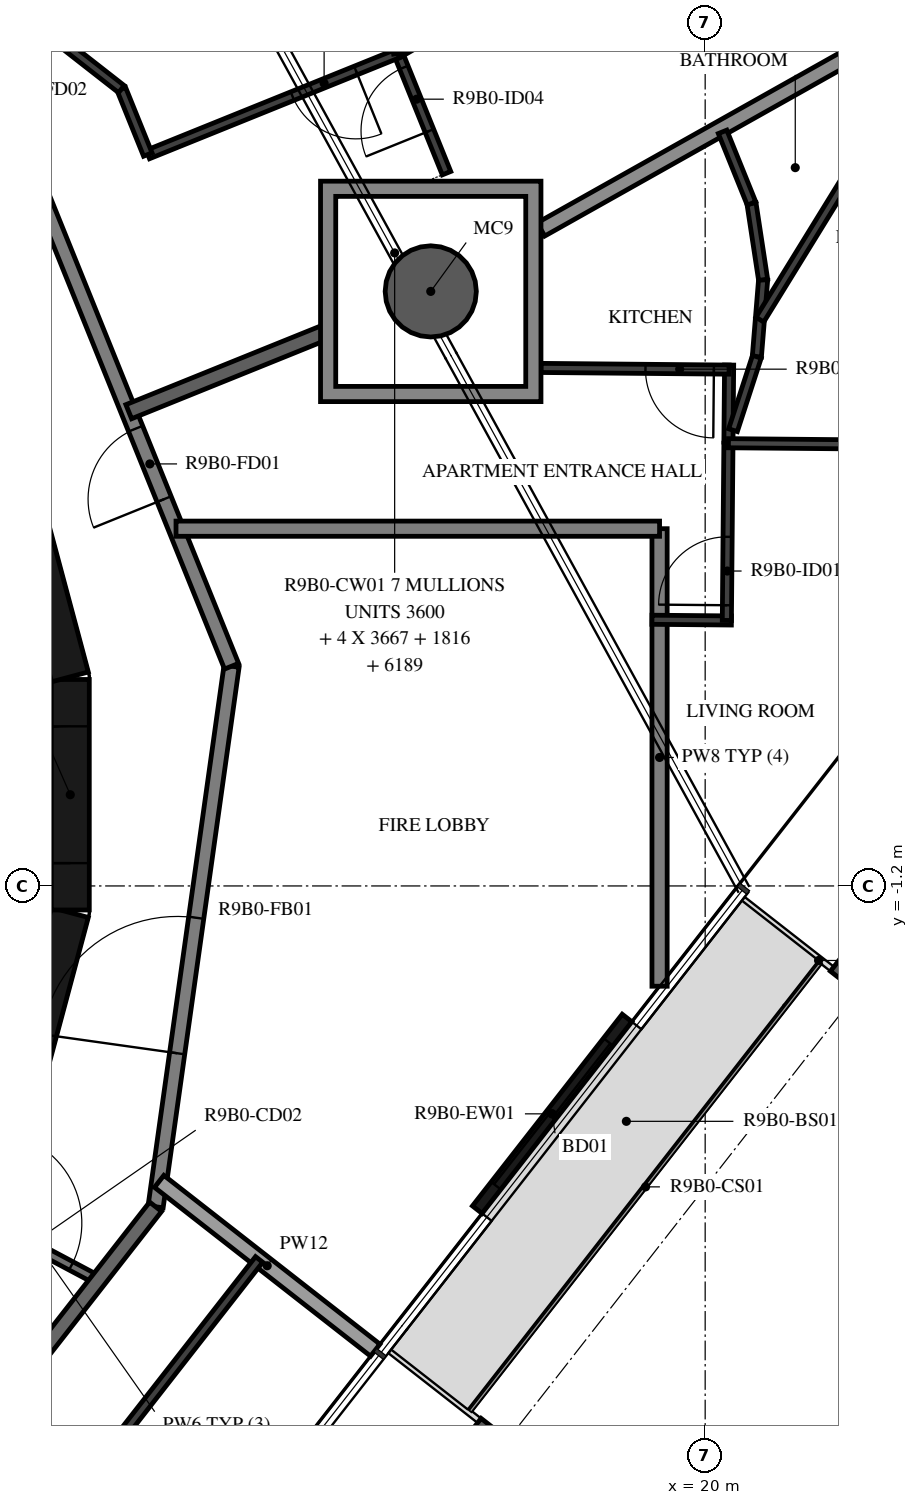
"""IFC4 building model, lengths in metres.
Left out: names, types, materials, properties, quantities, classifications, styles, units other than length and angle.
Written with IfcOpenShell. Run it as: python <this file> out.ifc"""

import sys

from ifc_helpers import new_model, si_unit, direction, frame, frame_2d, origin, origin_2d, place, context, subcontext, project, spatial, polyline, rectangle, hollow_circle, i_section, outline, extrude, element, fill, save


model = new_model("IFC4")
c1 = context("Model", 3, precision=1e-05, world=origin(), true_north=direction((0.0, 1.0)))
c2 = subcontext(c1, "Body", "Model", "MODEL_VIEW")
j1 = project(units=[si_unit("LENGTHUNIT", "METRE"), si_unit("PLANEANGLEUNIT", "RADIAN")], contexts=[c1])
p1 = place(None, origin())
s1 = spatial("IfcSite", under=j1, at=p1, CompositionType="ELEMENT")
p2 = place(p1, origin())
s2 = spatial("IfcBuilding", under=s1, at=p2, CompositionType="ELEMENT")
p3 = place(p2, frame((0.0, 0.0, 347.0)))
s3 = spatial("IfcBuildingStorey", under=s2, at=p3, CompositionType="ELEMENT", Elevation=347.0)
p4 = place(p3, frame((16.39, 6.622, -0.38), z_axis=(0.0, 0.0, 1.0), x_axis=(1.0, 0.0, 0.0)))
e1 = element("IfcColumn", 1, at=p4, inside=s3, PredefinedType="COLUMN", context=c2, shape_type="SweptSolid", body=[
    extrude(hollow_circle(Radius=0.6, WallThickness=0.03, at=origin_2d()), origin(), (0.0, 0.0, 1.0), 3.5),
])
for number, where, z_axis, x_axis in (
    (2, (17.314, -8.6, -0.38), (0.0, 0.0, 1.0), (-0.616, -0.788, 0.0)),
    (3, (22.095, -2.481, -0.38), (0.0, 0.0, 1.0), (-0.616, -0.788, 0.0)),
):
    element("IfcColumn", number, at=place(p3, frame(where, z_axis=z_axis, x_axis=x_axis)), inside=s3, PredefinedType="COLUMN", context=c2, shape_type="SweptSolid", body=[
        extrude(i_section(OverallWidth=0.3, OverallDepth=0.9, WebThickness=0.019, FlangeThickness=0.035, FilletRadius=0.03, at=origin_2d()), origin(), (0.0, 0.0, 1.0), 3.5),
    ])
p5 = place(p3, frame((17.002, -5.459, 0.0), z_axis=(0.0, 0.0, 1.0), x_axis=(0.615666248856, 0.788007024093, 0.0)))
e4 = element("IfcWall", 4, at=p5, inside=s3, PredefinedType="STANDARD", context=c2, shape_type="SweptSolid", body=[
    extrude(rectangle(XDim=3.2, YDim=0.16, at=frame_2d((1.6, 0.0))), origin(), (0.0, 0.0, 1.0), 3.12),
])
p6 = place(p5, frame((0.4, 0.0, 0.0)))
e5 = element("IfcOpeningElement", 5, at=p6, cuts=e4, PredefinedType="OPENING", context=c2, shape_type="SweptSolid", body=[
    extrude(rectangle(XDim=2.4, YDim=2.4, at=frame_2d((1.2, 1.2))), frame((0.0, 0.09, 0.0), z_axis=(0.0, -1.0, 0.0), x_axis=(1.0, 0.0, 0.0)), (0.0, 0.0, 1.0), 0.18),
])
p7 = place(p3, frame((10.858, -4.479, 0.0), z_axis=(0.0, 0.0, 1.0), x_axis=(0.258734743916, 0.965948410781, 0.0)))
e6 = element("IfcWall", 6, at=p7, inside=s3, PredefinedType="SHEAR", context=c2, shape_type="SweptSolid", body=[
    extrude(rectangle(XDim=3.033, YDim=0.5, at=frame_2d((1.516, 0.0))), origin(), (0.0, 0.0, 1.0), 3.12),
])
p8 = place(p3, frame((11.647, -1.516, 0.0), z_axis=(0.0, 0.0, 1.0), x_axis=(0.0, 1.0, 0.0)))
e7 = element("IfcWall", 7, at=p8, inside=s3, PredefinedType="SHEAR", context=c2, shape_type="SweptSolid", body=[
    extrude(rectangle(XDim=3.033, YDim=0.5, at=frame_2d((1.516, 0.0))), origin(), (0.0, 0.0, 1.0), 3.12),
])
p9 = place(p8, frame((0.616, 0.0, 0.0)))
e8 = element("IfcOpeningElement", 8, at=p9, cuts=e7, PredefinedType="OPENING", context=c2, shape_type="SweptSolid", body=[
    extrude(rectangle(XDim=1.8, YDim=2.1, at=frame_2d((0.9, 1.05))), frame((0.0, 0.26, 0.0), z_axis=(0.0, -1.0, 0.0), x_axis=(1.0, 0.0, 0.0)), (0.0, 0.0, 1.0), 0.52),
])
p10 = place(p3, frame((11.643, 1.55, 0.0), z_axis=(0.0, 0.0, 1.0), x_axis=(-0.258734743916, 0.965948410781, 0.0)))
e9 = element("IfcWall", 9, at=p10, inside=s3, PredefinedType="SHEAR", context=c2, shape_type="SweptSolid", body=[
    extrude(rectangle(XDim=3.033, YDim=0.5, at=frame_2d((1.516, 0.0))), origin(), (0.0, 0.0, 1.0), 3.12),
])
p11 = place(p3, frame((10.511, -5.589, 0.0), z_axis=(0.0, 0.0, 1.0), x_axis=(0.882959677414, -0.469448834337, 0.0)))
e10 = element("IfcWall", 10, at=p11, inside=s3, PredefinedType="PARTITIONING", context=c2, shape_type="SweptSolid", body=[
    extrude(rectangle(XDim=1.702, YDim=0.12, at=frame_2d((0.851, 0.0))), origin(), (0.0, 0.0, 1.0), 3.12),
])
p12 = place(p11, frame((0.1, 0.0, 0.0)))
e11 = element("IfcOpeningElement", 11, at=p12, cuts=e10, PredefinedType="OPENING", context=c2, shape_type="SweptSolid", body=[
    extrude(rectangle(XDim=1.2, YDim=2.1, at=frame_2d((0.6, 1.05))), frame((0.0, 0.07, 0.0), z_axis=(0.0, -1.0, 0.0), x_axis=(1.0, 0.0, 0.0)), (0.0, 0.0, 1.0), 0.14),
])
p13 = place(p3, frame((12.77, -5.42, 0.0), z_axis=(0.0, 0.0, 1.0), x_axis=(0.139155334385, 0.990270565508, 0.0)))
e12 = element("IfcWall", 12, at=p13, inside=s3, PredefinedType="STANDARD", context=c2, shape_type="SweptSolid", body=[
    extrude(rectangle(XDim=7.181, YDim=0.2, at=frame_2d((3.59, 0.0))), origin(), (0.0, 0.0, 1.0), 3.12),
])
p14 = place(p13, frame((2.039, 0.0, 0.0)))
e13 = element("IfcOpeningElement", 13, at=p14, cuts=e12, PredefinedType="OPENING", context=c2, shape_type="SweptSolid", body=[
    extrude(rectangle(XDim=1.8, YDim=2.1, at=frame_2d((0.9, 1.05))), frame((0.0, 0.11, 0.0), z_axis=(0.0, -1.0, 0.0), x_axis=(1.0, 0.0, 0.0)), (0.0, 0.0, 1.0), 0.22),
])
p15 = place(p3, frame((13.769, 1.691, 0.0), z_axis=(0.0, 0.0, 1.0), x_axis=(-0.374618189599, 0.92717916932, 0.0)))
e14 = element("IfcWall", 14, at=p15, inside=s3, PredefinedType="STANDARD", context=c2, shape_type="SweptSolid", body=[
    extrude(rectangle(XDim=7.181, YDim=0.2, at=frame_2d((3.591, 0.0))), origin(), (0.0, 0.0, 1.0), 3.12),
])
p16 = place(p15, frame((2.371, 0.0, 0.0)))
e15 = element("IfcOpeningElement", 15, at=p16, cuts=e14, PredefinedType="OPENING", context=c2, shape_type="SweptSolid", body=[
    extrude(rectangle(XDim=1.0, YDim=2.1, at=frame_2d((0.5, 1.05))), frame((0.0, 0.11, 0.0), z_axis=(0.0, -1.0, 0.0), x_axis=(1.0, 0.0, 0.0)), (0.0, 0.0, 1.0), 0.22),
])
p17 = place(p3, frame((8.349, -11.079, 0.0), z_axis=(0.0, 0.0, 1.0), x_axis=(0.615669112324, 0.78800478687, 0.0)))
e16 = element("IfcWall", 16, at=p17, inside=s3, PredefinedType="STANDARD", context=c2, shape_type="SweptSolid", body=[
    extrude(rectangle(XDim=7.181, YDim=0.2, at=frame_2d((3.591, 0.0))), origin(), (0.0, 0.0, 1.0), 3.12),
])
p18 = place(p3, frame((19.4, -2.519, 0.0), z_axis=(0.0, 0.0, 1.0), x_axis=(0.0, 1.0, 0.0)))
e17 = element("IfcWall", 17, at=p18, inside=s3, PredefinedType="STANDARD", context=c2, shape_type="SweptSolid", body=[
    extrude(rectangle(XDim=6.019, YDim=0.2, at=frame_2d((3.01, 0.0))), origin(), (0.0, 0.0, 1.0), 3.12),
])
p19 = place(p3, frame((19.4, 3.5, 0.0), z_axis=(0.0, 0.0, 1.0), x_axis=(-1.0, 0.0, 0.0)))
e18 = element("IfcWall", 18, at=p19, inside=s3, PredefinedType="STANDARD", context=c2, shape_type="SweptSolid", body=[
    extrude(rectangle(XDim=6.362, YDim=0.2, at=frame_2d((3.181, 0.0))), origin(), (0.0, 0.0, 1.0), 3.12),
])
p20 = place(p3, frame((12.817, -5.086, 0.0), z_axis=(0.0, 0.0, 1.0), x_axis=(0.787994616725, -0.615682129034, 0.0)))
e19 = element("IfcWall", 19, at=p20, inside=s3, PredefinedType="STANDARD", context=c2, shape_type="SweptSolid", body=[
    extrude(rectangle(XDim=3.607, YDim=0.2, at=frame_2d((1.804, 0.0))), origin(), (0.0, 0.0, 1.0), 2.73),
])
p21 = place(p3, frame((14.989, 6.079, 0.0), z_axis=(0.0, 0.0, 1.0), x_axis=(-0.927203056473, -0.374559063523, 0.0)))
e20 = element("IfcWall", 20, at=p21, inside=s3, PredefinedType="STANDARD", context=c2, shape_type="SweptSolid", body=[
    extrude(rectangle(XDim=2.775, YDim=0.2, at=frame_2d((1.387, 0.0))), origin(), (0.0, 0.0, 1.0), 3.12),
])
p22 = place(p3, frame((23.354, 10.537, 0.0), z_axis=(0.0, 0.0, 1.0), x_axis=(-0.871719790551, -0.490004700754, 0.0)))
e21 = element("IfcWall", 21, at=p22, inside=s3, PredefinedType="STANDARD", context=c2, shape_type="SweptSolid", body=[
    extrude(rectangle(XDim=6.326, YDim=0.2, at=frame_2d((3.163, 0.0))), origin(), (0.0, 0.0, 1.0), 2.73),
])
p23 = place(p3, frame((19.3, 2.302, 0.0), z_axis=(0.0, 0.0, 1.0), x_axis=(0.999958506341, -0.009109643015, 0.0)))
e22 = element("IfcWall", 22, at=p23, inside=s3, PredefinedType="PARTITIONING", context=c2, shape_type="SweptSolid", body=[
    extrude(rectangle(XDim=1.045, YDim=0.12, at=frame_2d((0.522, 0.0))), origin(), (0.0, 0.0, 1.0), 3.12),
])
p24 = place(p3, frame((20.285, 2.293, 0.0), z_axis=(0.0, 0.0, 1.0), x_axis=(0.008900171034, 0.999960392693, 0.0)))
e23 = element("IfcWall", 23, at=p24, inside=s3, PredefinedType="PARTITIONING", context=c2, shape_type="SweptSolid", body=[
    extrude(rectangle(XDim=2.332, YDim=0.12, at=frame_2d((1.166, 0.0))), origin(), (0.0, 0.0, 1.0), 3.12),
])
p25 = place(p24, frame((0.2, 0.0, 0.0)))
e24 = element("IfcOpeningElement", 24, at=p25, cuts=e23, PredefinedType="OPENING", context=c2, shape_type="SweptSolid", body=[
    extrude(rectangle(XDim=0.9, YDim=2.1, at=frame_2d((0.45, 1.05))), frame((0.0, 0.07, 0.0), z_axis=(0.0, -1.0, 0.0), x_axis=(1.0, 0.0, 0.0)), (0.0, 0.0, 1.0), 0.14),
])
p26 = place(p3, frame((20.306, 4.639, 0.0), z_axis=(0.0, 0.0, 1.0), x_axis=(0.008906724211, 0.999960334345, 0.0)))
e25 = element("IfcWall", 25, at=p26, inside=s3, PredefinedType="PARTITIONING", context=c2, shape_type="SweptSolid", body=[
    extrude(rectangle(XDim=1.014, YDim=0.12, at=frame_2d((0.507, 0.0))), origin(), (0.0, 0.0, 1.0), 3.12),
])
p27 = place(p3, frame((20.315, 5.593, 0.0), z_axis=(0.0, 0.0, 1.0), x_axis=(-0.999960597409, 0.008877140833, 0.0)))
e26 = element("IfcWall", 26, at=p27, inside=s3, PredefinedType="PARTITIONING", context=c2, shape_type="SweptSolid", body=[
    extrude(rectangle(XDim=2.475, YDim=0.12, at=frame_2d((1.238, 0.0))), origin(), (0.0, 0.0, 1.0), 3.12),
])
p28 = place(p27, frame((0.2, 0.0, 0.0)))
e27 = element("IfcOpeningElement", 27, at=p28, cuts=e26, PredefinedType="OPENING", context=c2, shape_type="SweptSolid", body=[
    extrude(rectangle(XDim=0.9, YDim=2.1, at=frame_2d((0.45, 1.05))), frame((0.0, 0.07, 0.0), z_axis=(0.0, -1.0, 0.0), x_axis=(1.0, 0.0, 0.0)), (0.0, 0.0, 1.0), 0.14),
])
p29 = place(p3, frame((24.085, 4.591, 0.0), z_axis=(0.0, 0.0, 1.0), x_axis=(-0.99996025077, 0.008916102255, 0.0)))
e28 = element("IfcWall", 28, at=p29, inside=s3, PredefinedType="PARTITIONING", context=c2, shape_type="SweptSolid", body=[
    extrude(rectangle(XDim=3.779, YDim=0.12, at=frame_2d((1.889, 0.0))), origin(), (0.0, 0.0, 1.0), 2.73),
])
p30 = place(p29, frame((0.2, 0.0, 0.0)))
e29 = element("IfcOpeningElement", 29, at=p30, cuts=e28, PredefinedType="OPENING", context=c2, shape_type="SweptSolid", body=[
    extrude(rectangle(XDim=0.9, YDim=2.1, at=frame_2d((0.45, 1.05))), frame((0.0, 0.07, 0.0), z_axis=(0.0, -1.0, 0.0), x_axis=(1.0, 0.0, 0.0)), (0.0, 0.0, 1.0), 0.14),
])
p31 = place(p3, frame((20.762, 6.775, 0.0), z_axis=(0.0, 0.0, 1.0), x_axis=(-0.08121587, -0.996696534789, 0.0)))
e30 = element("IfcWall", 30, at=p31, inside=s3, PredefinedType="PARTITIONING", context=c2, shape_type="SweptSolid", body=[
    extrude(rectangle(XDim=1.016, YDim=0.12, at=frame_2d((0.508, 0.0))), origin(), (0.0, 0.0, 1.0), 3.12),
])
p32 = place(p3, frame((20.68, 5.762, 0.0), z_axis=(0.0, 0.0, 1.0), x_axis=(-0.30908063779, -0.951035834942, 0.0)))
e31 = element("IfcWall", 31, at=p32, inside=s3, PredefinedType="PARTITIONING", context=c2, shape_type="SweptSolid", body=[
    extrude(rectangle(XDim=1.016, YDim=0.12, at=frame_2d((0.508, 0.0))), origin(), (0.0, 0.0, 1.0), 3.12),
])
p33 = place(p3, frame((23.357, 10.532, 0.0), z_axis=(0.0, 0.0, 1.0), x_axis=(-0.524476563806, -0.851424884542, 0.0)))
e32 = element("IfcWall", 32, at=p33, inside=s3, PredefinedType="PARTITIONING", context=c2, shape_type="SweptSolid", body=[
    extrude(rectangle(XDim=5.029, YDim=0.12, at=frame_2d((2.515, 0.0))), origin(), (0.0, 0.0, 1.0), 3.12),
])
p34 = place(p33, frame((1.5, 0.0, 0.0)))
e33 = element("IfcOpeningElement", 33, at=p34, cuts=e32, PredefinedType="OPENING", context=c2, shape_type="SweptSolid", body=[
    extrude(rectangle(XDim=0.8, YDim=2.1, at=frame_2d((0.4, 1.05))), frame((0.0, 0.07, 0.0), z_axis=(0.0, -1.0, 0.0), x_axis=(1.0, 0.0, 0.0)), (0.0, 0.0, 1.0), 0.14),
])
p35 = place(p3, frame((20.762, 6.775, 0.0), z_axis=(0.0, 0.0, 1.0), x_axis=(-0.150702440861, 0.988579169474, 0.0)))
e34 = element("IfcWall", 34, at=p35, inside=s3, PredefinedType="PARTITIONING", context=c2, shape_type="SweptSolid", body=[
    extrude(rectangle(XDim=1.016, YDim=0.12, at=frame_2d((0.508, 0.0))), origin(), (0.0, 0.0, 1.0), 3.12),
])
p36 = place(p3, frame((20.609, 7.779, 0.0), z_axis=(0.0, 0.0, 1.0), x_axis=(-0.374371668856, 0.927278735633, 0.0)))
e35 = element("IfcWall", 35, at=p36, inside=s3, PredefinedType="PARTITIONING", context=c2, shape_type="SweptSolid", body=[
    extrude(rectangle(XDim=1.016, YDim=0.12, at=frame_2d((0.508, 0.0))), origin(), (0.0, 0.0, 1.0), 3.12),
])
p37 = place(p3, frame((16.597, 8.177, 0.0), z_axis=(0.0, 0.0, 1.0), x_axis=(-0.374631609957, 0.927173746835, 0.0)))
e36 = element("IfcWall", 36, at=p37, inside=s3, PredefinedType="PARTITIONING", context=c2, shape_type="SweptSolid", body=[
    extrude(rectangle(XDim=1.7, YDim=0.12, at=frame_2d((0.85, 0.0))), origin(), (0.0, 0.0, 1.0), 3.12),
])
p38 = place(p37, frame((0.6, 0.0, 0.0)))
e37 = element("IfcOpeningElement", 37, at=p38, cuts=e36, PredefinedType="OPENING", context=c2, shape_type="SweptSolid", body=[
    extrude(rectangle(XDim=0.9, YDim=2.1, at=frame_2d((0.45, 1.05))), frame((0.0, 0.07, 0.0), z_axis=(0.0, -1.0, 0.0), x_axis=(1.0, 0.0, 0.0)), (0.0, 0.0, 1.0), 0.14),
])
p39 = place(p3, frame((15.96, 9.753, 0.0), z_axis=(0.0, 0.0, 1.0), x_axis=(-0.927148174805, -0.37469489182, 0.0)))
e38 = element("IfcWall", 38, at=p39, inside=s3, PredefinedType="PARTITIONING", context=c2, shape_type="SweptSolid", body=[
    extrude(rectangle(XDim=3.552, YDim=0.12, at=frame_2d((1.776, 0.0))), origin(), (0.0, 0.0, 1.0), 3.12),
])
p40 = place(p39, frame((0.6, 0.0, 0.0)))
e39 = element("IfcOpeningElement", 39, at=p40, cuts=e38, PredefinedType="OPENING", context=c2, shape_type="SweptSolid", body=[
    extrude(rectangle(XDim=0.9, YDim=2.1, at=frame_2d((0.45, 1.05))), frame((0.0, 0.07, 0.0), z_axis=(0.0, -1.0, 0.0), x_axis=(1.0, 0.0, 0.0)), (0.0, 0.0, 1.0), 0.14),
])
p41 = place(p3, frame((12.667, 8.423, 0.0), z_axis=(0.0, 0.0, 1.0), x_axis=(-0.374697807675, 0.927146996395, 0.0)))
e40 = element("IfcWall", 40, at=p41, inside=s3, PredefinedType="PARTITIONING", context=c2, shape_type="SweptSolid", body=[
    extrude(rectangle(XDim=0.928, YDim=0.12, at=frame_2d((0.464, 0.0))), origin(), (0.0, 0.0, 1.0), 3.12),
])
p42 = place(p3, frame((12.319, 9.283, 0.0), z_axis=(0.0, 0.0, 1.0), x_axis=(-0.788000268464, 0.61567489546, 0.0)))
e41 = element("IfcWall", 41, at=p42, inside=s3, PredefinedType="PARTITIONING", context=c2, shape_type="SweptSolid", body=[
    extrude(rectangle(XDim=7.985, YDim=0.12, at=frame_2d((3.992, 0.0))), origin(), (0.0, 0.0, 1.0), 3.12),
])
p43 = place(p42, frame((4.765, 0.0, 0.0)))
e42 = element("IfcOpeningElement", 42, at=p43, cuts=e41, PredefinedType="OPENING", context=c2, shape_type="SweptSolid", body=[
    extrude(rectangle(XDim=0.9, YDim=2.1, at=frame_2d((0.45, 1.05))), frame((0.0, 0.07, 0.0), z_axis=(0.0, -1.0, 0.0), x_axis=(1.0, 0.0, 0.0)), (0.0, 0.0, 1.0), 0.14),
])
p44 = place(p3, frame((21.343, 12.847, 0.0), z_axis=(0.0, 0.0, 1.0), x_axis=(-0.866974691568, -0.498352168832, 0.0)))
e43 = element("IfcWall", 43, at=p44, inside=s3, PredefinedType="PARTITIONING", context=c2, shape_type="SweptSolid", body=[
    extrude(rectangle(XDim=6.208, YDim=0.12, at=frame_2d((3.104, 0.0))), origin(), (0.0, 0.0, 1.0), 3.12),
])
p45 = place(p3, frame((18.649, 14.244, 0.0), z_axis=(0.0, 0.0, 1.0), x_axis=(-0.513782200586, -0.85792065505, 0.0)))
e44 = element("IfcWall", 44, at=p45, inside=s3, PredefinedType="PARTITIONING", context=c2, shape_type="SweptSolid", body=[
    extrude(rectangle(XDim=5.234, YDim=0.12, at=frame_2d((2.617, 0.0))), origin(), (0.0, 0.0, 1.0), 3.12),
])
p46 = place(p45, frame((0.2, 0.0, 0.0)))
e45 = element("IfcOpeningElement", 45, at=p46, cuts=e44, PredefinedType="OPENING", context=c2, shape_type="SweptSolid", body=[
    extrude(rectangle(XDim=0.8, YDim=2.1, at=frame_2d((0.4, 1.05))), frame((0.0, 0.07, 0.0), z_axis=(0.0, -1.0, 0.0), x_axis=(1.0, 0.0, 0.0)), (0.0, 0.0, 1.0), 0.14),
])
p47 = place(p3, frame((15.16, 14.873, 0.0), z_axis=(0.0, 0.0, 1.0), x_axis=(0.154389815045, -0.988010012606, 0.0)))
e46 = element("IfcWall", 46, at=p47, inside=s3, PredefinedType="PARTITIONING", context=c2, shape_type="SweptSolid", body=[
    extrude(rectangle(XDim=5.182, YDim=0.12, at=frame_2d((2.591, 0.0))), origin(), (0.0, 0.0, 1.0), 3.12),
])
p48 = place(p47, frame((0.2, 0.0, 0.0)))
e47 = element("IfcOpeningElement", 47, at=p48, cuts=e46, PredefinedType="OPENING", context=c2, shape_type="SweptSolid", body=[
    extrude(rectangle(XDim=0.9, YDim=2.1, at=frame_2d((0.45, 1.05))), frame((0.0, 0.07, 0.0), z_axis=(0.0, -1.0, 0.0), x_axis=(1.0, 0.0, 0.0)), (0.0, 0.0, 1.0), 0.14),
])
p49 = place(p3, frame((9.351, -12.233, 0.0), z_axis=(0.0, 0.0, 1.0), x_axis=(0.615678207218, 0.787997680933, 0.0)))
e48 = element("IfcWall", 48, at=p49, inside=s3, PredefinedType="PARTITIONING", context=c2, shape_type="SweptSolid", body=[
    extrude(rectangle(XDim=7.765, YDim=0.12, at=frame_2d((3.883, 0.0))), origin(), (0.0, 0.0, 1.0), 3.12),
])
p50 = place(p49, frame((0.2, 0.0, 0.0)))
e49 = element("IfcOpeningElement", 49, at=p50, cuts=e48, PredefinedType="OPENING", context=c2, shape_type="SweptSolid", body=[
    extrude(rectangle(XDim=0.9, YDim=2.1, at=frame_2d((0.45, 1.05))), frame((0.0, 0.07, 0.0), z_axis=(0.0, -1.0, 0.0), x_axis=(1.0, 0.0, 0.0)), (0.0, 0.0, 1.0), 0.14),
])
p51 = place(p3, origin())
e50 = element("IfcWall", 50, at=p51, inside=s3, PredefinedType="STANDARD", context=c2, shape_type="SweptSolid", body=[
    extrude(outline(polyline([(17.84, 8.072), (17.84, 5.172), (14.94, 5.172), (14.94, 8.072), (17.84, 8.072)]), holes=[polyline([(15.14, 5.372), (17.64, 5.372), (17.64, 7.872), (15.14, 7.872), (15.14, 5.372)])]), origin(), (0.0, 0.0, 1.0), 3.12),
])
p52 = place(p6, origin())
e51 = element("IfcDoor", 51, at=p52, inside=s3, OperationType="DOUBLE_DOOR_SLIDING", PredefinedType="DOOR", context=c2, shape_type="SweptSolid", body=[
    extrude(rectangle(XDim=2.4, YDim=2.4, at=frame_2d((1.2, 1.2))), frame((0.0, 0.025, 0.0), z_axis=(0.0, -1.0, 0.0), x_axis=(1.0, 0.0, 0.0)), (0.0, 0.0, 1.0), 0.05),
])
fill(e5, e51)
p53 = place(p9, origin())
e52 = element("IfcDoor", 52, at=p53, inside=s3, OperationType="DOUBLE_DOOR_SINGLE_SWING", PredefinedType="DOOR", context=c2, shape_type="SweptSolid", body=[
    extrude(rectangle(XDim=1.8, YDim=2.1, at=frame_2d((0.9, 1.05))), frame((0.0, 0.025, 0.0), z_axis=(0.0, -1.0, 0.0), x_axis=(1.0, 0.0, 0.0)), (0.0, 0.0, 1.0), 0.05),
])
fill(e8, e52)
p54 = place(p16, origin())
e53 = element("IfcDoor", 53, at=p54, inside=s3, OperationType="SINGLE_SWING_LEFT", PredefinedType="DOOR", context=c2, shape_type="SweptSolid", body=[
    extrude(rectangle(XDim=1.0, YDim=2.1, at=frame_2d((0.5, 1.05))), frame((0.0, 0.025, 0.0), z_axis=(0.0, -1.0, 0.0), x_axis=(1.0, 0.0, 0.0)), (0.0, 0.0, 1.0), 0.05),
])
fill(e15, e53)
p55 = place(p25, origin())
e54 = element("IfcDoor", 54, at=p55, inside=s3, OperationType="SINGLE_SWING_RIGHT", PredefinedType="DOOR", context=c2, shape_type="SweptSolid", body=[
    extrude(rectangle(XDim=0.9, YDim=2.1, at=frame_2d((0.45, 1.05))), frame((0.0, 0.025, 0.0), z_axis=(0.0, -1.0, 0.0), x_axis=(1.0, 0.0, 0.0)), (0.0, 0.0, 1.0), 0.05),
])
fill(e24, e54)
p56 = place(p28, origin())
e55 = element("IfcDoor", 55, at=p56, inside=s3, OperationType="SINGLE_SWING_RIGHT", PredefinedType="DOOR", context=c2, shape_type="SweptSolid", body=[
    extrude(rectangle(XDim=0.9, YDim=2.1, at=frame_2d((0.45, 1.05))), frame((0.0, 0.025, 0.0), z_axis=(0.0, -1.0, 0.0), x_axis=(1.0, 0.0, 0.0)), (0.0, 0.0, 1.0), 0.05),
])
fill(e27, e55)
p57 = place(p38, origin())
e56 = element("IfcDoor", 56, at=p57, inside=s3, OperationType="SINGLE_SWING_LEFT", PredefinedType="DOOR", context=c2, shape_type="SweptSolid", body=[
    extrude(rectangle(XDim=0.9, YDim=2.1, at=frame_2d((0.45, 1.05))), frame((0.0, 0.025, 0.0), z_axis=(0.0, -1.0, 0.0), x_axis=(1.0, 0.0, 0.0)), (0.0, 0.0, 1.0), 0.05),
])
fill(e37, e56)
p58 = place(p40, origin())
e57 = element("IfcDoor", 57, at=p58, inside=s3, OperationType="SINGLE_SWING_RIGHT", PredefinedType="DOOR", context=c2, shape_type="SweptSolid", body=[
    extrude(rectangle(XDim=0.9, YDim=2.1, at=frame_2d((0.45, 1.05))), frame((0.0, 0.025, 0.0), z_axis=(0.0, -1.0, 0.0), x_axis=(1.0, 0.0, 0.0)), (0.0, 0.0, 1.0), 0.05),
])
fill(e39, e57)
p59 = place(p12, origin())
e58 = element("IfcDoor", 58, at=p59, inside=s3, OperationType="DOUBLE_DOOR_SINGLE_SWING", PredefinedType="DOOR", context=c2, shape_type="SweptSolid", body=[
    extrude(rectangle(XDim=1.2, YDim=2.1, at=frame_2d((0.6, 1.05))), frame((0.0, 0.025, 0.0), z_axis=(0.0, -1.0, 0.0), x_axis=(1.0, 0.0, 0.0)), (0.0, 0.0, 1.0), 0.05),
])
fill(e11, e58)
p60 = place(p14, origin())
e59 = element("IfcDoor", 59, at=p60, inside=s3, OperationType="DOUBLE_DOOR_SINGLE_SWING", PredefinedType="DOOR", context=c2, shape_type="SweptSolid", body=[
    extrude(rectangle(XDim=1.8, YDim=2.1, at=frame_2d((0.9, 1.05))), frame((0.0, 0.025, 0.0), z_axis=(0.0, -1.0, 0.0), x_axis=(1.0, 0.0, 0.0)), (0.0, 0.0, 1.0), 0.05),
])
fill(e13, e59)
save(model, sys.argv[1])
